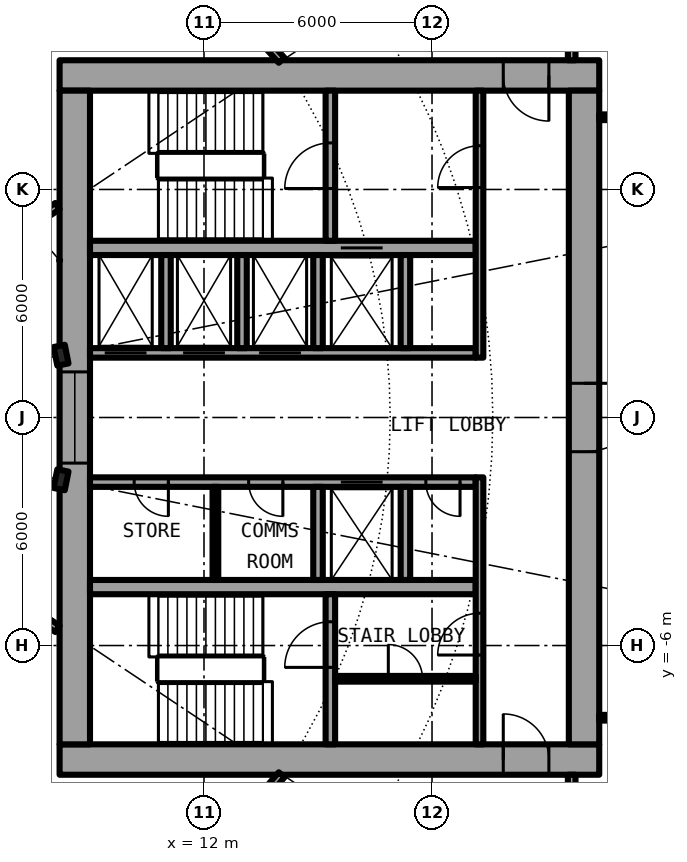
"""IFC4 building model, lengths in metres.
Left out: names, types, materials, properties, quantities, classifications, styles, units other than length and angle.
Written with IfcOpenShell. Run it as: python <this file> out.ifc"""

import sys

from ifc_helpers import new_model, si_unit, direction, frame, frame_2d, origin, origin_2d, place, context, subcontext, project, spatial, rectangle, i_section, extrude, element, fill, save


model = new_model("IFC4")
c1 = context("Model", 3, precision=1e-05, world=origin(), true_north=direction((0.0, 1.0)))
c2 = subcontext(c1, "Body", "Model", "MODEL_VIEW")
j1 = project(units=[si_unit("LENGTHUNIT", "METRE"), si_unit("PLANEANGLEUNIT", "RADIAN")], contexts=[c1])
p1 = place(None, origin())
s1 = spatial("IfcSite", under=j1, at=p1, CompositionType="ELEMENT")
p2 = place(p1, origin())
s2 = spatial("IfcBuilding", under=s1, at=p2, CompositionType="ELEMENT")
p3 = place(p2, frame((0.0, 0.0, 53.3)))
s3 = spatial("IfcBuildingStorey", under=s2, at=p3, CompositionType="ELEMENT", Elevation=53.3)
for number, where, z_axis, x_axis in (
    (1, (8.239, 1.639, 0.0), (0.0, 0.0, 1.0), (0.981, 0.195, 0.0)),
    (2, (8.239, -1.639, 0.0), (0.0, 0.0, 1.0), (0.981, -0.195, 0.0)),
):
    element("IfcColumn", number, at=place(p3, frame(where, z_axis=z_axis, x_axis=x_axis)), inside=s3, PredefinedType="COLUMN", context=c2, shape_type="SweptSolid", body=[
        extrude(i_section(OverallWidth=0.3, OverallDepth=0.5, WebThickness=0.014, FlangeThickness=0.028, FilletRadius=0.027, at=origin_2d()), origin(), (0.0, 0.0, 1.0), 4.2),
    ])
p4 = place(p3, frame((22.4, 9.0, 0.0), z_axis=(0.0, 0.0, 1.0), x_axis=(-1.0, 0.0, 0.0)))
e3 = element("IfcWall", 3, at=p4, inside=s3, PredefinedType="SHEAR", context=c2, shape_type="SweptSolid", body=[
    extrude(rectangle(XDim=14.2, YDim=0.8, at=frame_2d((7.1, 0.0))), origin(), (0.0, 0.0, 1.0), 4.2),
])
p5 = place(p4, frame((1.325, 0.0, 0.0)))
e4 = element("IfcOpeningElement", 4, at=p5, cuts=e3, PredefinedType="OPENING", context=c2, shape_type="SweptSolid", body=[
    extrude(rectangle(XDim=1.2, YDim=2.3, at=frame_2d((0.6, 1.15))), frame((0.0, 0.41, 0.0), z_axis=(0.0, -1.0, 0.0), x_axis=(1.0, 0.0, 0.0)), (0.0, 0.0, 1.0), 0.82),
])
p6 = place(p3, frame((8.2, -9.0, 0.0), z_axis=(0.0, 0.0, 1.0), x_axis=(1.0, 0.0, 0.0)))
e5 = element("IfcWall", 5, at=p6, inside=s3, PredefinedType="SHEAR", context=c2, shape_type="SweptSolid", body=[
    extrude(rectangle(XDim=14.2, YDim=0.8, at=frame_2d((7.1, 0.0))), origin(), (0.0, 0.0, 1.0), 4.2),
])
p7 = place(p6, frame((11.675, 0.0, 0.0)))
e6 = element("IfcOpeningElement", 6, at=p7, cuts=e5, PredefinedType="OPENING", context=c2, shape_type="SweptSolid", body=[
    extrude(rectangle(XDim=1.2, YDim=2.3, at=frame_2d((0.6, 1.15))), frame((0.0, 0.41, 0.0), z_axis=(0.0, -1.0, 0.0), x_axis=(1.0, 0.0, 0.0)), (0.0, 0.0, 1.0), 0.82),
])
p8 = place(p3, frame((22.0, 8.6, 0.0), z_axis=(0.0, 0.0, 1.0), x_axis=(0.0, -1.0, 0.0)))
e7 = element("IfcWall", 7, at=p8, inside=s3, PredefinedType="SHEAR", context=c2, shape_type="SweptSolid", body=[
    extrude(rectangle(XDim=17.2, YDim=0.8, at=frame_2d((8.6, 0.0))), origin(), (0.0, 0.0, 1.0), 4.2),
])
p9 = place(p8, frame((7.7, 0.0, 0.0)))
e8 = element("IfcOpeningElement", 8, at=p9, cuts=e7, PredefinedType="OPENING", context=c2, shape_type="SweptSolid", body=[
    extrude(rectangle(XDim=1.8, YDim=2.3, at=frame_2d((0.9, 1.15))), frame((0.0, 0.41, 0.0), z_axis=(0.0, -1.0, 0.0), x_axis=(1.0, 0.0, 0.0)), (0.0, 0.0, 1.0), 0.82),
])
p10 = place(p3, frame((8.6, -8.6, 0.0), z_axis=(0.0, 0.0, 1.0), x_axis=(0.0, 1.0, 0.0)))
e9 = element("IfcWall", 9, at=p10, inside=s3, PredefinedType="SHEAR", context=c2, shape_type="SweptSolid", body=[
    extrude(rectangle(XDim=17.2, YDim=0.8, at=frame_2d((8.6, 0.0))), origin(), (0.0, 0.0, 1.0), 4.2),
])
p11 = place(p10, frame((7.4, 0.0, 0.1)))
e10 = element("IfcOpeningElement", 10, at=p11, cuts=e9, PredefinedType="OPENING", context=c2, shape_type="SweptSolid", body=[
    extrude(rectangle(XDim=2.4, YDim=2.2, at=frame_2d((1.2, 1.1))), frame((0.0, 0.41, 0.0), z_axis=(0.0, -1.0, 0.0), x_axis=(1.0, 0.0, 0.0)), (0.0, 0.0, 1.0), 0.82),
])
p12 = place(p3, frame((9.0, 1.7, 0.0), z_axis=(0.0, 0.0, 1.0), x_axis=(1.0, 0.0, 0.0)))
e11 = element("IfcWall", 11, at=p12, inside=s3, PredefinedType="SHEAR", context=c2, shape_type="SweptSolid", body=[
    extrude(rectangle(XDim=10.15, YDim=0.25, at=frame_2d((5.075, 0.0))), origin(), (0.0, 0.0, 1.0), 4.2),
])
p13 = place(p12, frame((0.387, 0.0, 0.0)))
e12 = element("IfcOpeningElement", 12, at=p13, cuts=e11, PredefinedType="OPENING", context=c2, shape_type="SweptSolid", body=[
    extrude(rectangle(XDim=1.1, YDim=2.3, at=frame_2d((0.55, 1.15))), frame((0.0, 0.135, 0.0), z_axis=(0.0, -1.0, 0.0), x_axis=(1.0, 0.0, 0.0)), (0.0, 0.0, 1.0), 0.27),
])
p14 = place(p12, frame((2.45, 0.0, 0.0)))
e13 = element("IfcOpeningElement", 13, at=p14, cuts=e11, PredefinedType="OPENING", context=c2, shape_type="SweptSolid", body=[
    extrude(rectangle(XDim=1.1, YDim=2.3, at=frame_2d((0.55, 1.15))), frame((0.0, 0.135, 0.0), z_axis=(0.0, -1.0, 0.0), x_axis=(1.0, 0.0, 0.0)), (0.0, 0.0, 1.0), 0.27),
])
p15 = place(p12, frame((4.45, 0.0, 0.0)))
e14 = element("IfcOpeningElement", 14, at=p15, cuts=e11, PredefinedType="OPENING", context=c2, shape_type="SweptSolid", body=[
    extrude(rectangle(XDim=1.1, YDim=2.3, at=frame_2d((0.55, 1.15))), frame((0.0, 0.135, 0.0), z_axis=(0.0, -1.0, 0.0), x_axis=(1.0, 0.0, 0.0)), (0.0, 0.0, 1.0), 0.27),
])
p16 = place(p3, frame((9.0, 4.462, 0.0), z_axis=(0.0, 0.0, 1.0), x_axis=(1.0, 0.0, 0.0)))
e15 = element("IfcWall", 15, at=p16, inside=s3, PredefinedType="SHEAR", context=c2, shape_type="SweptSolid", body=[
    extrude(rectangle(XDim=10.15, YDim=0.375, at=frame_2d((5.075, 0.0))), origin(), (0.0, 0.0, 1.0), 4.2),
])
p17 = place(p16, frame((6.6, 0.0, 0.0)))
e16 = element("IfcOpeningElement", 16, at=p17, cuts=e15, PredefinedType="OPENING", context=c2, shape_type="SweptSolid", body=[
    extrude(rectangle(XDim=1.1, YDim=2.3, at=frame_2d((0.55, 1.15))), frame((0.0, 0.198, 0.0), z_axis=(0.0, -1.0, 0.0), x_axis=(1.0, 0.0, 0.0)), (0.0, 0.0, 1.0), 0.395),
])
p18 = place(p3, frame((15.325, 4.65, 0.0), z_axis=(0.0, 0.0, 1.0), x_axis=(0.0, 1.0, 0.0)))
e17 = element("IfcWall", 17, at=p18, inside=s3, PredefinedType="SHEAR", context=c2, shape_type="SweptSolid", body=[
    extrude(rectangle(XDim=3.95, YDim=0.25, at=frame_2d((1.975, 0.0))), origin(), (0.0, 0.0, 1.0), 4.2),
])
p19 = place(p18, frame((1.375, 0.0, 0.0)))
e18 = element("IfcOpeningElement", 18, at=p19, cuts=e17, PredefinedType="OPENING", context=c2, shape_type="SweptSolid", body=[
    extrude(rectangle(XDim=1.2, YDim=2.3, at=frame_2d((0.6, 1.15))), frame((0.0, 0.135, 0.0), z_axis=(0.0, -1.0, 0.0), x_axis=(1.0, 0.0, 0.0)), (0.0, 0.0, 1.0), 0.27),
])
for number, where, z_axis, x_axis in (
    (19, (15.0, 1.825, 0.0), (0.0, 0.0, 1.0), (0.0, 1.0, 0.0)),
    (20, (17.3, 1.825, 0.0), (0.0, 0.0, 1.0), (0.0, 1.0, 0.0)),
):
    element("IfcWall", number, at=place(p3, frame(where, z_axis=z_axis, x_axis=x_axis)), inside=s3, PredefinedType="SOLIDWALL", context=c2, shape_type="SweptSolid", body=[
        extrude(rectangle(XDim=2.45, YDim=0.25, at=frame_2d((1.225, 0.0))), origin(), (0.0, 0.0, 1.0), 3.8),
    ])
p20 = place(p3, frame((19.25, 1.575, 0.0), z_axis=(0.0, 0.0, 1.0), x_axis=(0.0, 1.0, 0.0)))
e21 = element("IfcWall", 21, at=p20, inside=s3, PredefinedType="SOLIDWALL", context=c2, shape_type="SweptSolid", body=[
    extrude(rectangle(XDim=7.025, YDim=0.2, at=frame_2d((3.513, 0.0))), origin(), (0.0, 0.0, 1.0), 3.8),
])
p21 = place(p20, frame((4.475, 0.0, 0.0)))
e22 = element("IfcOpeningElement", 22, at=p21, cuts=e21, PredefinedType="OPENING", context=c2, shape_type="SweptSolid", body=[
    extrude(rectangle(XDim=1.1, YDim=2.3, at=frame_2d((0.55, 1.15))), frame((0.0, 0.11, 0.0), z_axis=(0.0, -1.0, 0.0), x_axis=(1.0, 0.0, 0.0)), (0.0, 0.0, 1.0), 0.22),
])
p22 = place(p3, frame((19.15, -1.7, 0.0), z_axis=(0.0, 0.0, 1.0), x_axis=(-1.0, 0.0, 0.0)))
e23 = element("IfcWall", 23, at=p22, inside=s3, PredefinedType="SHEAR", context=c2, shape_type="SweptSolid", body=[
    extrude(rectangle(XDim=10.15, YDim=0.25, at=frame_2d((5.075, 0.0))), origin(), (0.0, 0.0, 1.0), 4.2),
])
p23 = place(p22, frame((2.45, 0.0, 0.0)))
e24 = element("IfcOpeningElement", 24, at=p23, cuts=e23, PredefinedType="OPENING", context=c2, shape_type="SweptSolid", body=[
    extrude(rectangle(XDim=1.1, YDim=2.3, at=frame_2d((0.55, 1.15))), frame((0.0, 0.135, 0.0), z_axis=(0.0, -1.0, 0.0), x_axis=(1.0, 0.0, 0.0)), (0.0, 0.0, 1.0), 0.27),
])
p24 = place(p22, frame((8.087, 0.0, 0.0)))
e25 = element("IfcOpeningElement", 25, at=p24, cuts=e23, PredefinedType="OPENING", context=c2, shape_type="SweptSolid", body=[
    extrude(rectangle(XDim=0.9, YDim=2.3, at=frame_2d((0.45, 1.15))), frame((0.0, 0.135, 0.0), z_axis=(0.0, -1.0, 0.0), x_axis=(1.0, 0.0, 0.0)), (0.0, 0.0, 1.0), 0.27),
])
p25 = place(p22, frame((5.075, 0.0, 0.0)))
e26 = element("IfcOpeningElement", 26, at=p25, cuts=e23, PredefinedType="OPENING", context=c2, shape_type="SweptSolid", body=[
    extrude(rectangle(XDim=0.9, YDim=2.3, at=frame_2d((0.45, 1.15))), frame((0.0, 0.135, 0.0), z_axis=(0.0, -1.0, 0.0), x_axis=(1.0, 0.0, 0.0)), (0.0, 0.0, 1.0), 0.27),
])
p26 = place(p22, frame((0.413, 0.0, 0.0)))
e27 = element("IfcOpeningElement", 27, at=p26, cuts=e23, PredefinedType="OPENING", context=c2, shape_type="SweptSolid", body=[
    extrude(rectangle(XDim=0.9, YDim=2.3, at=frame_2d((0.45, 1.15))), frame((0.0, 0.135, 0.0), z_axis=(0.0, -1.0, 0.0), x_axis=(1.0, 0.0, 0.0)), (0.0, 0.0, 1.0), 0.27),
])
p27 = place(p3, frame((9.0, -4.462, 0.0), z_axis=(0.0, 0.0, 1.0), x_axis=(1.0, 0.0, 0.0)))
e28 = element("IfcWall", 28, at=p27, inside=s3, PredefinedType="SHEAR", context=c2, shape_type="SweptSolid", body=[
    extrude(rectangle(XDim=10.15, YDim=0.375, at=frame_2d((5.075, 0.0))), origin(), (0.0, 0.0, 1.0), 4.2),
])
p28 = place(p3, frame((15.325, -8.6, 0.0), z_axis=(0.0, 0.0, 1.0), x_axis=(0.0, 1.0, 0.0)))
e29 = element("IfcWall", 29, at=p28, inside=s3, PredefinedType="SHEAR", context=c2, shape_type="SweptSolid", body=[
    extrude(rectangle(XDim=3.95, YDim=0.25, at=frame_2d((1.975, 0.0))), origin(), (0.0, 0.0, 1.0), 4.2),
])
p29 = place(p28, frame((2.025, 0.0, 0.0)))
e30 = element("IfcOpeningElement", 30, at=p29, cuts=e29, PredefinedType="OPENING", context=c2, shape_type="SweptSolid", body=[
    extrude(rectangle(XDim=1.2, YDim=2.3, at=frame_2d((0.6, 1.15))), frame((0.0, 0.135, 0.0), z_axis=(0.0, -1.0, 0.0), x_axis=(1.0, 0.0, 0.0)), (0.0, 0.0, 1.0), 0.27),
])
for number, where, z_axis, x_axis in (
    (31, (15.0, -1.825, 0.0), (0.0, 0.0, 1.0), (0.0, -1.0, 0.0)),
    (32, (17.3, -1.825, 0.0), (0.0, 0.0, 1.0), (0.0, -1.0, 0.0)),
):
    element("IfcWall", number, at=place(p3, frame(where, z_axis=z_axis, x_axis=x_axis)), inside=s3, PredefinedType="SOLIDWALL", context=c2, shape_type="SweptSolid", body=[
        extrude(rectangle(XDim=2.45, YDim=0.25, at=frame_2d((1.225, 0.0))), origin(), (0.0, 0.0, 1.0), 3.8),
    ])
p30 = place(p3, frame((19.25, -8.6, 0.0), z_axis=(0.0, 0.0, 1.0), x_axis=(0.0, 1.0, 0.0)))
e33 = element("IfcWall", 33, at=p30, inside=s3, PredefinedType="SOLIDWALL", context=c2, shape_type="SweptSolid", body=[
    extrude(rectangle(XDim=7.025, YDim=0.2, at=frame_2d((3.513, 0.0))), origin(), (0.0, 0.0, 1.0), 3.8),
])
p31 = place(p30, frame((2.35, 0.0, 0.0)))
e34 = element("IfcOpeningElement", 34, at=p31, cuts=e33, PredefinedType="OPENING", context=c2, shape_type="SweptSolid", body=[
    extrude(rectangle(XDim=1.1, YDim=2.3, at=frame_2d((0.55, 1.15))), frame((0.0, 0.11, 0.0), z_axis=(0.0, -1.0, 0.0), x_axis=(1.0, 0.0, 0.0)), (0.0, 0.0, 1.0), 0.22),
])
for number, where, z_axis, x_axis in (
    (35, (11.0, 1.825, 0.0), (0.0, 0.0, 1.0), (0.0, 1.0, 0.0)),
    (36, (13.0, 1.825, 0.0), (0.0, 0.0, 1.0), (0.0, 1.0, 0.0)),
):
    element("IfcWall", number, at=place(p3, frame(where, z_axis=z_axis, x_axis=x_axis)), inside=s3, PredefinedType="SOLIDWALL", context=c2, shape_type="SweptSolid", body=[
        extrude(rectangle(XDim=2.45, YDim=0.25, at=frame_2d((1.225, 0.0))), origin(), (0.0, 0.0, 1.0), 3.8),
    ])
p32 = place(p3, frame((12.3, -1.825, 0.0), z_axis=(0.0, 0.0, 1.0), x_axis=(0.0, -1.0, 0.0)))
e37 = element("IfcWall", 37, at=p32, inside=s3, PredefinedType="PARTITIONING", context=c2, shape_type="SweptSolid", body=[
    extrude(rectangle(XDim=2.45, YDim=0.15, at=frame_2d((1.225, 0.0))), origin(), (0.0, 0.0, 1.0), 3.8),
])
p33 = place(p3, frame((15.45, -6.875, 0.0), z_axis=(0.0, 0.0, 1.0), x_axis=(1.0, 0.0, 0.0)))
e38 = element("IfcWall", 38, at=p33, inside=s3, PredefinedType="PARTITIONING", context=c2, shape_type="SweptSolid", body=[
    extrude(rectangle(XDim=3.7, YDim=0.15, at=frame_2d((1.85, 0.0))), origin(), (0.0, 0.0, 1.0), 3.8),
])
p34 = place(p33, frame((1.4, 0.0, 0.0)))
e39 = element("IfcOpeningElement", 39, at=p34, cuts=e38, PredefinedType="OPENING", context=c2, shape_type="SweptSolid", body=[
    extrude(rectangle(XDim=0.9, YDim=2.3, at=frame_2d((0.45, 1.15))), frame((0.0, 0.085, 0.0), z_axis=(0.0, -1.0, 0.0), x_axis=(1.0, 0.0, 0.0)), (0.0, 0.0, 1.0), 0.17),
])
for number, where, z_axis, x_axis in (
    (40, (22.4, -7.9, 0.0), (0.0, 0.0, 1.0), (1.0, 0.0, 0.0)),
    (41, (22.4, 7.9, 0.0), (0.0, 0.0, 1.0), (1.0, 0.0, 0.0)),
):
    element("IfcWall", number, at=place(p3, frame(where, z_axis=z_axis, x_axis=x_axis)), inside=s3, PredefinedType="PARTITIONING", context=c2, shape_type="SweptSolid", body=[
        extrude(rectangle(XDim=2.54, YDim=0.15, at=frame_2d((1.27, 0.0))), origin(), (0.0, 0.0, 1.0), 3.8),
    ])
for number, where, z_axis, x_axis in (
    (42, (21.675, -11.0, 0.0), (0.0, 0.0, 1.0), (0.0, 1.0, 0.0)),
    (43, (21.675, 9.4, 0.0), (0.0, 0.0, 1.0), (0.0, 1.0, 0.0)),
):
    element("IfcWall", number, at=place(p3, frame(where, z_axis=z_axis, x_axis=x_axis)), inside=s3, PredefinedType="PARTITIONING", context=c2, shape_type="SweptSolid", body=[
        extrude(rectangle(XDim=1.6, YDim=0.2, at=frame_2d((0.8, 0.0))), origin(), (0.0, 0.0, 1.0), 3.8),
    ])
p35 = place(p3, frame((11.349, -12.522, 0.0), z_axis=(0.0, 0.0, 1.0), x_axis=(0.653274518104, 0.757121129012, 0.0)))
e44 = element("IfcWall", 44, at=p35, inside=s3, PredefinedType="PARTITIONING", context=c2, shape_type="SweptSolid", body=[
    extrude(rectangle(XDim=4.124, YDim=0.2, at=frame_2d((2.062, 0.0))), origin(), (0.0, 0.0, 1.0), 3.8),
])
p36 = place(p3, frame((6.513, -4.472, 0.0), z_axis=(0.0, 0.0, 1.0), x_axis=(0.831417956244, -0.555647533996, 0.0)))
e45 = element("IfcWall", 45, at=p36, inside=s3, PredefinedType="PARTITIONING", context=c2, shape_type="SweptSolid", body=[
    extrude(rectangle(XDim=1.962, YDim=0.2, at=frame_2d((0.981, 0.0))), origin(), (0.0, 0.0, 1.0), 3.8),
])
p37 = place(p3, frame((3.638, -6.809, 0.0), z_axis=(0.0, 0.0, 1.0), x_axis=(0.471460365694, -0.881887251059, 0.0)))
e46 = element("IfcWall", 46, at=p37, inside=s3, PredefinedType="PARTITIONING", context=c2, shape_type="SweptSolid", body=[
    extrude(rectangle(XDim=9.18, YDim=0.15, at=frame_2d((4.59, 0.0))), origin(), (0.0, 0.0, 1.0), 3.8),
])
p38 = place(p3, frame((6.513, 4.472, 0.0), z_axis=(0.0, 0.0, 1.0), x_axis=(0.831417956244, 0.555647533996, 0.0)))
e47 = element("IfcWall", 47, at=p38, inside=s3, PredefinedType="PARTITIONING", context=c2, shape_type="SweptSolid", body=[
    extrude(rectangle(XDim=1.962, YDim=0.2, at=frame_2d((0.981, 0.0))), origin(), (0.0, 0.0, 1.0), 3.8),
])
p39 = place(p3, frame((10.721, 13.064, 0.0), z_axis=(0.0, 0.0, 1.0), x_axis=(0.671573636767, -0.740937818173, 0.0)))
e48 = element("IfcWall", 48, at=p39, inside=s3, PredefinedType="PARTITIONING", context=c2, shape_type="SweptSolid", body=[
    extrude(rectangle(XDim=4.945, YDim=0.2, at=frame_2d((2.473, 0.0))), origin(), (0.0, 0.0, 1.0), 3.8),
])
p40 = place(p13, origin())
e49 = element("IfcDoor", 49, at=p40, inside=s3, OperationType="DOUBLE_DOOR_SLIDING", PredefinedType="DOOR", context=c2, shape_type="SweptSolid", body=[
    extrude(rectangle(XDim=1.1, YDim=2.3, at=frame_2d((0.55, 1.15))), frame((0.0, 0.025, 0.0), z_axis=(0.0, -1.0, 0.0), x_axis=(1.0, 0.0, 0.0)), (0.0, 0.0, 1.0), 0.05),
])
fill(e12, e49)
p41 = place(p14, origin())
e50 = element("IfcDoor", 50, at=p41, inside=s3, OperationType="DOUBLE_DOOR_SLIDING", PredefinedType="DOOR", context=c2, shape_type="SweptSolid", body=[
    extrude(rectangle(XDim=1.1, YDim=2.3, at=frame_2d((0.55, 1.15))), frame((0.0, 0.025, 0.0), z_axis=(0.0, -1.0, 0.0), x_axis=(1.0, 0.0, 0.0)), (0.0, 0.0, 1.0), 0.05),
])
fill(e13, e50)
p42 = place(p15, origin())
e51 = element("IfcDoor", 51, at=p42, inside=s3, OperationType="DOUBLE_DOOR_SLIDING", PredefinedType="DOOR", context=c2, shape_type="SweptSolid", body=[
    extrude(rectangle(XDim=1.1, YDim=2.3, at=frame_2d((0.55, 1.15))), frame((0.0, 0.025, 0.0), z_axis=(0.0, -1.0, 0.0), x_axis=(1.0, 0.0, 0.0)), (0.0, 0.0, 1.0), 0.05),
])
fill(e14, e51)
p43 = place(p17, origin())
e52 = element("IfcDoor", 52, at=p43, inside=s3, OperationType="DOUBLE_DOOR_SLIDING", PredefinedType="DOOR", context=c2, shape_type="SweptSolid", body=[
    extrude(rectangle(XDim=1.1, YDim=2.3, at=frame_2d((0.55, 1.15))), frame((0.0, 0.025, 0.0), z_axis=(0.0, -1.0, 0.0), x_axis=(1.0, 0.0, 0.0)), (0.0, 0.0, 1.0), 0.05),
])
fill(e16, e52)
p44 = place(p23, origin())
e53 = element("IfcDoor", 53, at=p44, inside=s3, OperationType="DOUBLE_DOOR_SLIDING", PredefinedType="DOOR", context=c2, shape_type="SweptSolid", body=[
    extrude(rectangle(XDim=1.1, YDim=2.3, at=frame_2d((0.55, 1.15))), frame((0.0, 0.025, 0.0), z_axis=(0.0, -1.0, 0.0), x_axis=(1.0, 0.0, 0.0)), (0.0, 0.0, 1.0), 0.05),
])
fill(e24, e53)
p45 = place(p24, origin())
e54 = element("IfcDoor", 54, at=p45, inside=s3, OperationType="SINGLE_SWING_LEFT", PredefinedType="DOOR", context=c2, shape_type="SweptSolid", body=[
    extrude(rectangle(XDim=0.9, YDim=2.3, at=frame_2d((0.45, 1.15))), frame((0.0, 0.025, 0.0), z_axis=(0.0, -1.0, 0.0), x_axis=(1.0, 0.0, 0.0)), (0.0, 0.0, 1.0), 0.05),
])
fill(e25, e54)
p46 = place(p25, origin())
e55 = element("IfcDoor", 55, at=p46, inside=s3, OperationType="SINGLE_SWING_LEFT", PredefinedType="DOOR", context=c2, shape_type="SweptSolid", body=[
    extrude(rectangle(XDim=0.9, YDim=2.3, at=frame_2d((0.45, 1.15))), frame((0.0, 0.025, 0.0), z_axis=(0.0, -1.0, 0.0), x_axis=(1.0, 0.0, 0.0)), (0.0, 0.0, 1.0), 0.05),
])
fill(e26, e55)
p47 = place(p26, origin())
e56 = element("IfcDoor", 56, at=p47, inside=s3, OperationType="SINGLE_SWING_RIGHT", PredefinedType="DOOR", context=c2, shape_type="SweptSolid", body=[
    extrude(rectangle(XDim=0.9, YDim=2.3, at=frame_2d((0.45, 1.15))), frame((0.0, 0.025, 0.0), z_axis=(0.0, -1.0, 0.0), x_axis=(1.0, 0.0, 0.0)), (0.0, 0.0, 1.0), 0.05),
])
fill(e27, e56)
p48 = place(p34, origin())
e57 = element("IfcDoor", 57, at=p48, inside=s3, OperationType="SINGLE_SWING_LEFT", PredefinedType="DOOR", context=c2, shape_type="SweptSolid", body=[
    extrude(rectangle(XDim=0.9, YDim=2.3, at=frame_2d((0.45, 1.15))), frame((0.0, 0.025, 0.0), z_axis=(0.0, -1.0, 0.0), x_axis=(1.0, 0.0, 0.0)), (0.0, 0.0, 1.0), 0.05),
])
fill(e39, e57)
p49 = place(p19, origin())
e58 = element("IfcDoor", 58, at=p49, inside=s3, OperationType="SINGLE_SWING_LEFT", PredefinedType="DOOR", context=c2, shape_type="SweptSolid", body=[
    extrude(rectangle(XDim=1.2, YDim=2.3, at=frame_2d((0.6, 1.15))), frame((0.0, 0.025, 0.0), z_axis=(0.0, -1.0, 0.0), x_axis=(1.0, 0.0, 0.0)), (0.0, 0.0, 1.0), 0.05),
])
fill(e18, e58)
p50 = place(p29, origin())
e59 = element("IfcDoor", 59, at=p50, inside=s3, OperationType="SINGLE_SWING_LEFT", PredefinedType="DOOR", context=c2, shape_type="SweptSolid", body=[
    extrude(rectangle(XDim=1.2, YDim=2.3, at=frame_2d((0.6, 1.15))), frame((0.0, 0.025, 0.0), z_axis=(0.0, -1.0, 0.0), x_axis=(1.0, 0.0, 0.0)), (0.0, 0.0, 1.0), 0.05),
])
fill(e30, e59)
p51 = place(p21, origin())
e60 = element("IfcDoor", 60, at=p51, inside=s3, OperationType="SINGLE_SWING_LEFT", PredefinedType="DOOR", context=c2, shape_type="SweptSolid", body=[
    extrude(rectangle(XDim=1.1, YDim=2.3, at=frame_2d((0.55, 1.15))), frame((0.0, 0.025, 0.0), z_axis=(0.0, -1.0, 0.0), x_axis=(1.0, 0.0, 0.0)), (0.0, 0.0, 1.0), 0.05),
])
fill(e22, e60)
p52 = place(p31, origin())
e61 = element("IfcDoor", 61, at=p52, inside=s3, OperationType="SINGLE_SWING_RIGHT", PredefinedType="DOOR", context=c2, shape_type="SweptSolid", body=[
    extrude(rectangle(XDim=1.1, YDim=2.3, at=frame_2d((0.55, 1.15))), frame((0.0, 0.025, 0.0), z_axis=(0.0, -1.0, 0.0), x_axis=(1.0, 0.0, 0.0)), (0.0, 0.0, 1.0), 0.05),
])
fill(e34, e61)
p53 = place(p5, origin())
e62 = element("IfcDoor", 62, at=p53, inside=s3, OperationType="SINGLE_SWING_RIGHT", PredefinedType="DOOR", context=c2, shape_type="SweptSolid", body=[
    extrude(rectangle(XDim=1.2, YDim=2.3, at=frame_2d((0.6, 1.15))), frame((0.0, 0.025, 0.0), z_axis=(0.0, -1.0, 0.0), x_axis=(1.0, 0.0, 0.0)), (0.0, 0.0, 1.0), 0.05),
])
fill(e4, e62)
p54 = place(p7, origin())
e63 = element("IfcDoor", 63, at=p54, inside=s3, OperationType="SINGLE_SWING_LEFT", PredefinedType="DOOR", context=c2, shape_type="SweptSolid", body=[
    extrude(rectangle(XDim=1.2, YDim=2.3, at=frame_2d((0.6, 1.15))), frame((0.0, 0.025, 0.0), z_axis=(0.0, -1.0, 0.0), x_axis=(1.0, 0.0, 0.0)), (0.0, 0.0, 1.0), 0.05),
])
fill(e6, e63)
p55 = place(p9, origin())
e64 = element("IfcDoor", 64, at=p55, inside=s3, OperationType="SINGLE_SWING_LEFT", PredefinedType="DOOR", context=c2, shape_type="SweptSolid", body=[
    extrude(rectangle(XDim=1.8, YDim=2.3, at=frame_2d((0.9, 1.15))), frame((0.0, 0.025, 0.0), z_axis=(0.0, -1.0, 0.0), x_axis=(1.0, 0.0, 0.0)), (0.0, 0.0, 1.0), 0.05),
])
fill(e8, e64)
p56 = place(p11, origin())
e65 = element("IfcWindow", 65, at=p56, inside=s3, PartitioningType="SINGLE_PANEL", PredefinedType="WINDOW", context=c2, shape_type="SweptSolid", body=[
    extrude(rectangle(XDim=2.4, YDim=2.2, at=frame_2d((1.2, 1.1))), frame((0.0, 0.03, 0.0), z_axis=(0.0, -1.0, 0.0), x_axis=(1.0, 0.0, 0.0)), (0.0, 0.0, 1.0), 0.06),
])
fill(e10, e65)
save(model, sys.argv[1])
